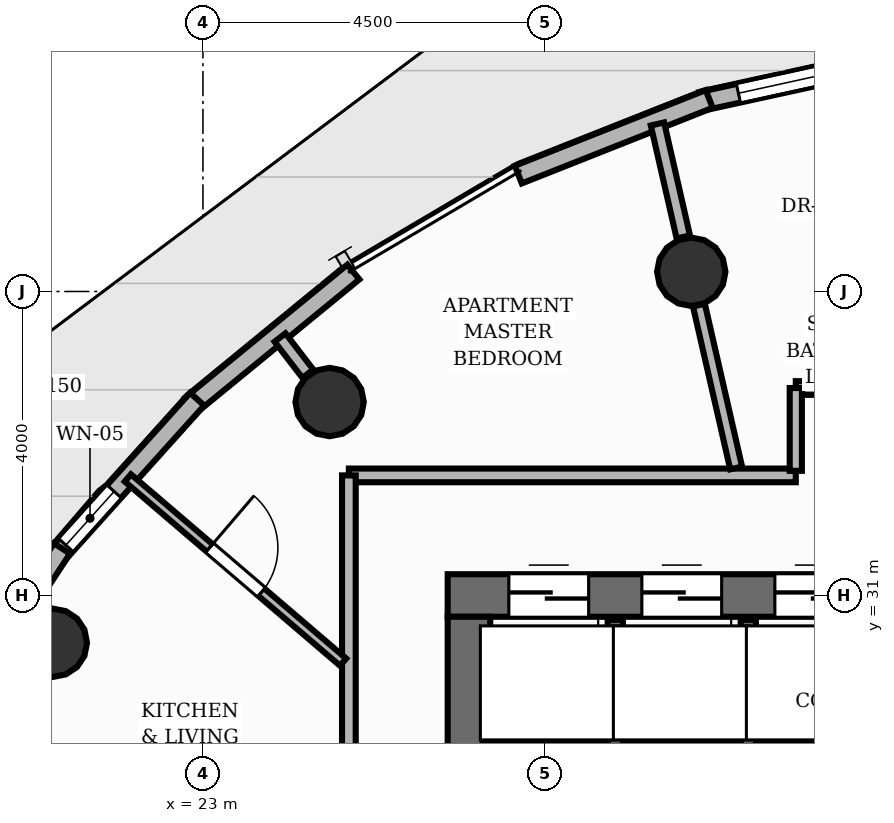
"""IFC4 building model, lengths in metres.
Left out: names, types, materials, properties, quantities, classifications, styles, units other than length and angle.
Written with IfcOpenShell. Run it as: python <this file> out.ifc"""

import sys

from ifc_helpers import new_model, si_unit, direction, frame, frame_2d, origin, origin_2d, place, context, subcontext, project, spatial, rectangle, circle, extrude, element, fill, save


model = new_model("IFC4")
c1 = context("Model", 3, precision=1e-05, world=origin(), true_north=direction((0.0, 1.0)))
c2 = subcontext(c1, "Body", "Model", "MODEL_VIEW")
j1 = project(units=[si_unit("LENGTHUNIT", "METRE"), si_unit("PLANEANGLEUNIT", "RADIAN")], contexts=[c1])
p1 = place(None, origin())
s1 = spatial("IfcSite", under=j1, at=p1, CompositionType="ELEMENT")
p2 = place(p1, origin())
s2 = spatial("IfcBuilding", under=s1, at=p2, CompositionType="ELEMENT")
p3 = place(p2, frame((0.0, 0.0, 182.24)))
s3 = spatial("IfcBuildingStorey", under=s2, at=p3, CompositionType="ELEMENT", Elevation=182.24)
p4 = place(p3, frame((26.22, 31.0, 0.0), z_axis=(0.0, 0.0, 1.0), x_axis=(1.0, 0.0, 0.0)))
e1 = element("IfcWall", 1, at=p4, inside=s3, PredefinedType="SHEAR", context=c2, shape_type="SweptSolid", body=[
    extrude(rectangle(XDim=11.56, YDim=0.56, at=frame_2d((5.78, 0.0))), origin(), (0.0, 0.0, 1.0), 3.2),
])
p5 = place(p4, frame((8.18, 0.0, 0.0)))
e2 = element("IfcOpeningElement", 2, at=p5, cuts=e1, PredefinedType="OPENING", context=c2, shape_type="SweptSolid", body=[
    extrude(rectangle(XDim=1.1, YDim=2.15, at=frame_2d((0.55, 1.075))), frame((0.0, 0.29, 0.0), z_axis=(0.0, -1.0, 0.0), x_axis=(1.0, 0.0, 0.0)), (0.0, 0.0, 1.0), 0.58),
])
p6 = place(p4, frame((0.805, 0.0, 0.0)))
e3 = element("IfcOpeningElement", 3, at=p6, cuts=e1, PredefinedType="OPENING", context=c2, shape_type="SweptSolid", body=[
    extrude(rectangle(XDim=1.05, YDim=2.15, at=frame_2d((0.525, 1.075))), frame((0.0, 0.29, 0.0), z_axis=(0.0, -1.0, 0.0), x_axis=(1.0, 0.0, 0.0)), (0.0, 0.0, 1.0), 0.58),
])
p7 = place(p4, frame((2.555, 0.0, 0.0)))
e4 = element("IfcOpeningElement", 4, at=p7, cuts=e1, PredefinedType="OPENING", context=c2, shape_type="SweptSolid", body=[
    extrude(rectangle(XDim=1.05, YDim=2.15, at=frame_2d((0.525, 1.075))), frame((0.0, 0.29, 0.0), z_axis=(0.0, -1.0, 0.0), x_axis=(1.0, 0.0, 0.0)), (0.0, 0.0, 1.0), 0.58),
])
p8 = place(p4, frame((4.305, 0.0, 0.0)))
e5 = element("IfcOpeningElement", 5, at=p8, cuts=e1, PredefinedType="OPENING", context=c2, shape_type="SweptSolid", body=[
    extrude(rectangle(XDim=1.05, YDim=2.15, at=frame_2d((0.525, 1.075))), frame((0.0, 0.29, 0.0), z_axis=(0.0, -1.0, 0.0), x_axis=(1.0, 0.0, 0.0)), (0.0, 0.0, 1.0), 0.58),
])
p9 = place(p3, frame((26.5, 17.28, 0.0), z_axis=(0.0, 0.0, 1.0), x_axis=(0.0, 1.0, 0.0)))
e6 = element("IfcWall", 6, at=p9, inside=s3, PredefinedType="SHEAR", context=c2, shape_type="SweptSolid", body=[
    extrude(rectangle(XDim=13.44, YDim=0.56, at=frame_2d((6.72, 0.0))), origin(), (0.0, 0.0, 1.0), 3.2),
])
for number, where, z_axis, x_axis in (
    (7, (29.425, 35.26, 0.0), (0.0, 0.0, 1.0), (1.0, 0.0, 0.0)),
    (8, (24.667, 33.545, 0.0), (0.0, 0.0, 1.0), (1.0, 0.0, 0.0)),
    (9, (21.025, 30.378, 0.0), (0.0, 0.0, 1.0), (1.0, 0.0, 0.0)),
):
    element("IfcColumn", number, at=place(p3, frame(where, z_axis=z_axis, x_axis=x_axis)), inside=s3, PredefinedType="COLUMN", context=c2, shape_type="SweptSolid", body=[
        extrude(circle(Radius=0.45, at=origin_2d()), origin(), (0.0, 0.0, 1.0), 3.2),
    ])
p10 = place(p3, frame((29.556, 37.501, 0.0), z_axis=(0.0, 0.0, 1.0), x_axis=(0.976886196324, 0.213760051067, 0.0)))
e10 = element("IfcWall", 10, at=p10, inside=s3, PredefinedType="SOLIDWALL", context=c2, shape_type="SweptSolid", body=[
    extrude(rectangle(XDim=2.651, YDim=0.25, at=frame_2d((1.325, 0.0))), origin(), (0.0, 0.0, 1.0), 2.96),
])
p11 = place(p10, frame((0.501, 0.0, 0.85)))
e11 = element("IfcOpeningElement", 11, at=p11, cuts=e10, PredefinedType="OPENING", context=c2, shape_type="SweptSolid", body=[
    extrude(rectangle(XDim=1.65, YDim=1.55, at=frame_2d((0.825, 0.775))), frame((0.0, 0.135, 0.0), z_axis=(0.0, -1.0, 0.0), x_axis=(1.0, 0.0, 0.0)), (0.0, 0.0, 1.0), 0.27),
])
p12 = place(p3, frame((27.149, 36.538, 0.0), z_axis=(0.0, 0.0, 1.0), x_axis=(0.929693178164, 0.368334894459, 0.0)))
e12 = element("IfcWall", 12, at=p12, inside=s3, PredefinedType="SOLIDWALL", context=c2, shape_type="SweptSolid", body=[
    extrude(rectangle(XDim=2.702, YDim=0.25, at=frame_2d((1.351, 0.0))), origin(), (0.0, 0.0, 1.0), 2.96),
])
p13 = place(p3, frame((22.845, 33.508, 0.0), z_axis=(0.0, 0.0, 1.0), x_axis=(0.773491700486, 0.633806428872, 0.0)))
e13 = element("IfcWall", 13, at=p13, inside=s3, PredefinedType="SOLIDWALL", context=c2, shape_type="SweptSolid", body=[
    extrude(rectangle(XDim=2.758, YDim=0.25, at=frame_2d((1.379, 0.0))), origin(), (0.0, 0.0, 1.0), 2.96),
])
p14 = place(p3, frame((21.079, 31.532, 0.0), z_axis=(0.0, 0.0, 1.0), x_axis=(0.668764193685, 0.743474581438, 0.0)))
e14 = element("IfcWall", 14, at=p14, inside=s3, PredefinedType="SOLIDWALL", context=c2, shape_type="SweptSolid", body=[
    extrude(rectangle(XDim=2.758, YDim=0.25, at=frame_2d((1.379, 0.0))), origin(), (0.0, 0.0, 1.0), 2.96),
])
p15 = place(p14, frame((0.175, 0.0, 0.85)))
e15 = element("IfcOpeningElement", 15, at=p15, cuts=e14, PredefinedType="OPENING", context=c2, shape_type="SweptSolid", body=[
    extrude(rectangle(XDim=0.95, YDim=1.45, at=frame_2d((0.475, 0.725))), frame((0.0, 0.135, 0.0), z_axis=(0.0, -1.0, 0.0), x_axis=(1.0, 0.0, 0.0)), (0.0, 0.0, 1.0), 0.27),
])
p16 = place(p3, frame((19.646, 29.327, 0.0), z_axis=(0.0, 0.0, 1.0), x_axis=(0.547664848596, 0.83669780304, 0.0)))
e16 = element("IfcWall", 16, at=p16, inside=s3, PredefinedType="SOLIDWALL", context=c2, shape_type="SweptSolid", body=[
    extrude(rectangle(XDim=2.739, YDim=0.25, at=frame_2d((1.369, 0.0))), origin(), (0.0, 0.0, 1.0), 2.96),
])
for number, where, z_axis, x_axis in (
    (17, (28.425, 29.02, 0.0), (0.0, 0.0, 1.0), (0.0, 1.0, 0.0)),
    (18, (30.175, 29.02, 0.0), (0.0, 0.0, 1.0), (0.0, 1.0, 0.0)),
):
    element("IfcWall", number, at=place(p3, frame(where, z_axis=z_axis, x_axis=x_axis)), inside=s3, PredefinedType="SHEAR", context=c2, shape_type="SweptSolid", body=[
        extrude(rectangle(XDim=1.66, YDim=0.2, at=frame_2d((0.83, 0.0))), origin(), (0.0, 0.0, 1.0), 3.2),
    ])
p17 = place(p3, frame((29.32, 35.718, 0.0), z_axis=(0.0, 0.0, 1.0), x_axis=(-0.222976920769, 0.974823723965, 0.0)))
e19 = element("IfcWall", 19, at=p17, inside=s3, PredefinedType="PARTITIONING", context=c2, shape_type="SweptSolid", body=[
    extrude(rectangle(XDim=1.525, YDim=0.18, at=frame_2d((0.763, 0.0))), origin(), (0.0, 0.0, 1.0), 2.403),
])
p18 = place(p3, frame((24.38, 33.918, 0.0), z_axis=(0.0, 0.0, 1.0), x_axis=(-0.609062571598, 0.793122174623, 0.0)))
e20 = element("IfcWall", 20, at=p18, inside=s3, PredefinedType="PARTITIONING", context=c2, shape_type="SweptSolid", body=[
    extrude(rectangle(XDim=0.601, YDim=0.18, at=frame_2d((0.3, 0.0))), origin(), (0.0, 0.0, 1.0), 2.403),
])
p19 = place(p3, frame((30.8, 33.73, 0.0), z_axis=(0.0, 0.0, 1.0), x_axis=(1.0, 0.0, 0.0)))
e21 = element("IfcWall", 21, at=p19, inside=s3, PredefinedType="PARTITIONING", context=c2, shape_type="SweptSolid", body=[
    extrude(rectangle(XDim=2.4, YDim=0.18, at=frame_2d((1.2, 0.0))), origin(), (0.0, 0.0, 1.0), 2.955),
])
p20 = place(p3, frame((24.92, 32.58, 0.0), z_axis=(0.0, 0.0, 1.0), x_axis=(1.0, 0.0, 0.0)))
e22 = element("IfcWall", 22, at=p20, inside=s3, PredefinedType="PARTITIONING", context=c2, shape_type="SweptSolid", body=[
    extrude(rectangle(XDim=5.88, YDim=0.18, at=frame_2d((2.94, 0.0))), origin(), (0.0, 0.0, 1.0), 2.955),
])
p21 = place(p3, frame((30.8, 32.64, 0.0), z_axis=(0.0, 0.0, 1.0), x_axis=(0.0, 1.0, 0.0)))
e23 = element("IfcWall", 23, at=p21, inside=s3, PredefinedType="PLUMBINGWALL", context=c2, shape_type="SweptSolid", body=[
    extrude(rectangle(XDim=1.09, YDim=0.16, at=frame_2d((0.545, 0.0))), origin(), (0.0, 0.0, 1.0), 2.955),
])
p22 = place(p3, frame((24.92, 19.449, 0.0), z_axis=(0.0, 0.0, 1.0), x_axis=(0.0, 1.0, 0.0)))
e24 = element("IfcWall", 24, at=p22, inside=s3, PredefinedType="PARTITIONING", context=c2, shape_type="SweptSolid", body=[
    extrude(rectangle(XDim=13.131, YDim=0.18, at=frame_2d((6.565, 0.0))), origin(), (0.0, 0.0, 1.0), 2.955),
])
p23 = place(p22, frame((7.897, 0.0, 0.0)))
e25 = element("IfcOpeningElement", 25, at=p23, cuts=e24, PredefinedType="OPENING", context=c2, shape_type="SweptSolid", body=[
    extrude(rectangle(XDim=1.05, YDim=2.15, at=frame_2d((0.525, 1.075))), frame((0.0, 0.1, 0.0), z_axis=(0.0, -1.0, 0.0), x_axis=(1.0, 0.0, 0.0)), (0.0, 0.0, 1.0), 0.2),
])
p24 = place(p3, frame((30.015, 32.677, 0.0), z_axis=(0.0, 0.0, 1.0), x_axis=(-0.222969522248, 0.974825416241, 0.0)))
e26 = element("IfcWall", 26, at=p24, inside=s3, PredefinedType="PLUMBINGWALL", context=c2, shape_type="SweptSolid", body=[
    extrude(rectangle(XDim=2.199, YDim=0.16, at=frame_2d((1.099, 0.0))), origin(), (0.0, 0.0, 1.0), 2.403),
])
p25 = place(p3, frame((22.012, 32.547, 0.0), z_axis=(0.0, 0.0, 1.0), x_axis=(0.759801913408, -0.650154637284, 0.0)))
e27 = element("IfcWall", 27, at=p25, inside=s3, PredefinedType="PARTITIONING", context=c2, shape_type="SweptSolid", body=[
    extrude(rectangle(XDim=3.727, YDim=0.125, at=frame_2d((1.864, 0.0))), origin(), (0.0, 0.0, 1.0), 2.955),
])
p26 = place(p25, frame((1.414, 0.0, 0.0)))
e28 = element("IfcOpeningElement", 28, at=p26, cuts=e27, PredefinedType="OPENING", context=c2, shape_type="SweptSolid", body=[
    extrude(rectangle(XDim=0.9, YDim=2.1, at=frame_2d((0.45, 1.05))), frame((0.0, 0.073, 0.0), z_axis=(0.0, -1.0, 0.0), x_axis=(1.0, 0.0, 0.0)), (0.0, 0.0, 1.0), 0.145),
])
p27 = place(p11, origin())
e29 = element("IfcWindow", 29, at=p27, inside=s3, PartitioningType="SINGLE_PANEL", PredefinedType="WINDOW", context=c2, shape_type="SweptSolid", body=[
    extrude(rectangle(XDim=1.65, YDim=1.55, at=frame_2d((0.825, 0.775))), frame((0.0, 0.03, 0.0), z_axis=(0.0, -1.0, 0.0), x_axis=(1.0, 0.0, 0.0)), (0.0, 0.0, 1.0), 0.06),
])
fill(e11, e29)
p28 = place(p15, origin())
e30 = element("IfcWindow", 30, at=p28, inside=s3, PartitioningType="SINGLE_PANEL", PredefinedType="WINDOW", context=c2, shape_type="SweptSolid", body=[
    extrude(rectangle(XDim=0.95, YDim=1.45, at=frame_2d((0.475, 0.725))), frame((0.0, 0.03, 0.0), z_axis=(0.0, -1.0, 0.0), x_axis=(1.0, 0.0, 0.0)), (0.0, 0.0, 1.0), 0.06),
])
fill(e15, e30)
p29 = place(p6, origin())
e31 = element("IfcDoor", 31, at=p29, inside=s3, OperationType="DOUBLE_DOOR_SLIDING", PredefinedType="DOOR", context=c2, shape_type="SweptSolid", body=[
    extrude(rectangle(XDim=1.05, YDim=2.15, at=frame_2d((0.525, 1.075))), frame((0.0, 0.025, 0.0), z_axis=(0.0, -1.0, 0.0), x_axis=(1.0, 0.0, 0.0)), (0.0, 0.0, 1.0), 0.05),
])
fill(e3, e31)
p30 = place(p7, origin())
e32 = element("IfcDoor", 32, at=p30, inside=s3, OperationType="DOUBLE_DOOR_SLIDING", PredefinedType="DOOR", context=c2, shape_type="SweptSolid", body=[
    extrude(rectangle(XDim=1.05, YDim=2.15, at=frame_2d((0.525, 1.075))), frame((0.0, 0.025, 0.0), z_axis=(0.0, -1.0, 0.0), x_axis=(1.0, 0.0, 0.0)), (0.0, 0.0, 1.0), 0.05),
])
fill(e4, e32)
p31 = place(p8, origin())
e33 = element("IfcDoor", 33, at=p31, inside=s3, OperationType="DOUBLE_DOOR_SLIDING", PredefinedType="DOOR", context=c2, shape_type="SweptSolid", body=[
    extrude(rectangle(XDim=1.05, YDim=2.15, at=frame_2d((0.525, 1.075))), frame((0.0, 0.025, 0.0), z_axis=(0.0, -1.0, 0.0), x_axis=(1.0, 0.0, 0.0)), (0.0, 0.0, 1.0), 0.05),
])
fill(e5, e33)
p32 = place(p26, origin())
e34 = element("IfcDoor", 34, at=p32, inside=s3, OperationType="SINGLE_SWING_LEFT", PredefinedType="DOOR", context=c2, shape_type="SweptSolid", body=[
    extrude(rectangle(XDim=0.9, YDim=2.1, at=frame_2d((0.45, 1.05))), frame((0.0, 0.025, 0.0), z_axis=(0.0, -1.0, 0.0), x_axis=(1.0, 0.0, 0.0)), (0.0, 0.0, 1.0), 0.05),
])
fill(e28, e34)
save(model, sys.argv[1])
